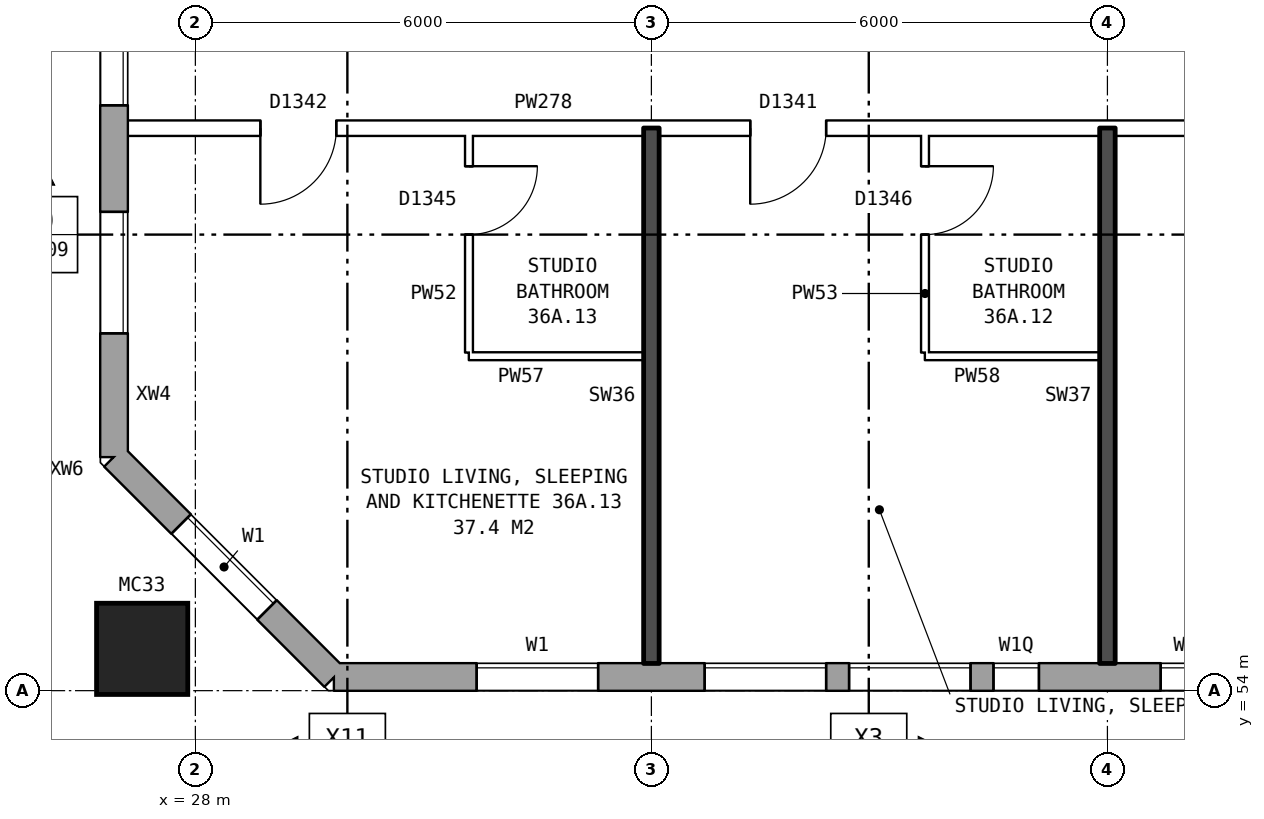
"""IFC4 building model, lengths in metres.
Left out: names, types, materials, properties, quantities, classifications, styles, units other than length and angle.
Written with IfcOpenShell. Run it as: python <this file> out.ifc"""

import sys

from ifc_helpers import new_model, si_unit, direction, frame, frame_2d, origin, origin_2d, place, context, subcontext, project, spatial, rectangle, hollow_rectangle, extrude, element, fill, save


model = new_model("IFC4")
c1 = context("Model", 3, precision=1e-05, world=origin(), true_north=direction((0.0, 1.0)))
c2 = subcontext(c1, "Body", "Model", "MODEL_VIEW")
j1 = project(units=[si_unit("LENGTHUNIT", "METRE"), si_unit("PLANEANGLEUNIT", "RADIAN")], contexts=[c1])
p1 = place(None, origin())
s1 = spatial("IfcSite", under=j1, at=p1, CompositionType="ELEMENT")
p2 = place(p1, origin())
s2 = spatial("IfcBuilding", under=s1, at=p2, CompositionType="ELEMENT")
p3 = place(p2, frame((0.0, 0.0, 129.9)))
s3 = spatial("IfcBuildingStorey", under=s2, at=p3, CompositionType="ELEMENT", Elevation=129.9)
p4 = place(p3, frame((27.3, 54.55, 0.0), z_axis=(0.0, 0.0, 1.0), x_axis=(1.0, 0.0, 0.0)))
e1 = element("IfcColumn", 1, at=p4, inside=s3, PredefinedType="COLUMN", context=c2, shape_type="SweptSolid", body=[
    extrude(hollow_rectangle(XDim=1.2, YDim=1.2, WallThickness=0.065, at=origin_2d()), origin(), (0.0, 0.0, 1.0), 3.1),
])
p5 = place(p3, frame((26.93, 57.075, 0.0), z_axis=(0.0, 0.0, 1.0), x_axis=(0.707106781187, -0.707106781187, 0.0)))
e2 = element("IfcWall", 2, at=p5, inside=s3, PredefinedType="STANDARD", context=c2, shape_type="SweptSolid", body=[
    extrude(rectangle(XDim=4.094, YDim=0.36, at=frame_2d((2.047, 0.0))), origin(), (0.0, 0.0, 1.0), 2.85),
])
p6 = place(p5, frame((1.247, 0.0, 0.8)))
e3 = element("IfcOpeningElement", 3, at=p6, cuts=e2, PredefinedType="OPENING", context=c2, shape_type="SweptSolid", body=[
    extrude(rectangle(XDim=1.6, YDim=1.8, at=frame_2d((0.8, 0.9))), frame((0.0, 0.19, 0.0), z_axis=(0.0, -1.0, 0.0), x_axis=(1.0, 0.0, 0.0)), (0.0, 0.0, 1.0), 0.38),
])
p7 = place(p3, frame((29.825, 54.18, 0.0), z_axis=(0.0, 0.0, 1.0), x_axis=(1.0, 0.0, 0.0)))
e4 = element("IfcWall", 4, at=p7, inside=s3, PredefinedType="STANDARD", context=c2, shape_type="SweptSolid", body=[
    extrude(rectangle(XDim=43.101, YDim=0.36, at=frame_2d((21.55, 0.0))), origin(), (0.0, 0.0, 1.0), 2.85),
])
p8 = place(p7, frame((1.875, 0.0, 0.8)))
e5 = element("IfcOpeningElement", 5, at=p8, cuts=e4, PredefinedType="OPENING", context=c2, shape_type="SweptSolid", body=[
    extrude(rectangle(XDim=1.6, YDim=1.8, at=frame_2d((0.8, 0.9))), frame((0.0, 0.19, 0.0), z_axis=(0.0, -1.0, 0.0), x_axis=(1.0, 0.0, 0.0)), (0.0, 0.0, 1.0), 0.38),
])
p9 = place(p7, frame((4.875, 0.0, 0.8)))
e6 = element("IfcOpeningElement", 6, at=p9, cuts=e4, PredefinedType="OPENING", context=c2, shape_type="SweptSolid", body=[
    extrude(rectangle(XDim=1.6, YDim=1.8, at=frame_2d((0.8, 0.9))), frame((0.0, 0.19, 0.0), z_axis=(0.0, -1.0, 0.0), x_axis=(1.0, 0.0, 0.0)), (0.0, 0.0, 1.0), 0.38),
])
p10 = place(p7, frame((6.775, 0.0, 0.8)))
e7 = element("IfcOpeningElement", 7, at=p10, cuts=e4, PredefinedType="OPENING", context=c2, shape_type="SweptSolid", body=[
    extrude(rectangle(XDim=1.6, YDim=1.8, at=frame_2d((0.8, 0.9))), frame((0.0, 0.19, 0.0), z_axis=(0.0, -1.0, 0.0), x_axis=(1.0, 0.0, 0.0)), (0.0, 0.0, 1.0), 0.38),
])
p11 = place(p7, frame((10.875, 0.0, 0.8)))
e8 = element("IfcOpeningElement", 8, at=p11, cuts=e4, PredefinedType="OPENING", context=c2, shape_type="SweptSolid", body=[
    extrude(rectangle(XDim=0.8, YDim=0.9, at=frame_2d((0.4, 0.45))), frame((0.0, 0.19, 0.0), z_axis=(0.0, -1.0, 0.0), x_axis=(1.0, 0.0, 0.0)), (0.0, 0.0, 1.0), 0.38),
])
p12 = place(p7, frame((13.875, 0.0, 0.8)))
e9 = element("IfcOpeningElement", 9, at=p12, cuts=e4, PredefinedType="OPENING", context=c2, shape_type="SweptSolid", body=[
    extrude(rectangle(XDim=1.6, YDim=1.8, at=frame_2d((0.8, 0.9))), frame((0.0, 0.19, 0.0), z_axis=(0.0, -1.0, 0.0), x_axis=(1.0, 0.0, 0.0)), (0.0, 0.0, 1.0), 0.38),
])
p13 = place(p7, frame((16.875, 0.0, 0.8)))
e10 = element("IfcOpeningElement", 10, at=p13, cuts=e4, PredefinedType="OPENING", context=c2, shape_type="SweptSolid", body=[
    extrude(rectangle(XDim=1.6, YDim=1.8, at=frame_2d((0.8, 0.9))), frame((0.0, 0.19, 0.0), z_axis=(0.0, -1.0, 0.0), x_axis=(1.0, 0.0, 0.0)), (0.0, 0.0, 1.0), 0.38),
])
p14 = place(p7, frame((19.875, 0.0, 0.8)))
e11 = element("IfcOpeningElement", 11, at=p14, cuts=e4, PredefinedType="OPENING", context=c2, shape_type="SweptSolid", body=[
    extrude(rectangle(XDim=1.6, YDim=1.8, at=frame_2d((0.8, 0.9))), frame((0.0, 0.19, 0.0), z_axis=(0.0, -1.0, 0.0), x_axis=(1.0, 0.0, 0.0)), (0.0, 0.0, 1.0), 0.38),
])
p15 = place(p7, frame((22.875, 0.0, 0.8)))
e12 = element("IfcOpeningElement", 12, at=p15, cuts=e4, PredefinedType="OPENING", context=c2, shape_type="SweptSolid", body=[
    extrude(rectangle(XDim=1.6, YDim=1.8, at=frame_2d((0.8, 0.9))), frame((0.0, 0.19, 0.0), z_axis=(0.0, -1.0, 0.0), x_axis=(1.0, 0.0, 0.0)), (0.0, 0.0, 1.0), 0.38),
])
p16 = place(p7, frame((25.875, 0.0, 0.8)))
e13 = element("IfcOpeningElement", 13, at=p16, cuts=e4, PredefinedType="OPENING", context=c2, shape_type="SweptSolid", body=[
    extrude(rectangle(XDim=1.6, YDim=1.8, at=frame_2d((0.8, 0.9))), frame((0.0, 0.19, 0.0), z_axis=(0.0, -1.0, 0.0), x_axis=(1.0, 0.0, 0.0)), (0.0, 0.0, 1.0), 0.38),
])
p17 = place(p7, frame((28.875, 0.0, 0.8)))
e14 = element("IfcOpeningElement", 14, at=p17, cuts=e4, PredefinedType="OPENING", context=c2, shape_type="SweptSolid", body=[
    extrude(rectangle(XDim=1.6, YDim=1.8, at=frame_2d((0.8, 0.9))), frame((0.0, 0.19, 0.0), z_axis=(0.0, -1.0, 0.0), x_axis=(1.0, 0.0, 0.0)), (0.0, 0.0, 1.0), 0.38),
])
p18 = place(p7, frame((31.325, 0.0, 0.15)))
e15 = element("IfcOpeningElement", 15, at=p18, cuts=e4, PredefinedType="OPENING", context=c2, shape_type="SweptSolid", body=[
    extrude(rectangle(XDim=0.6, YDim=1.8, at=frame_2d((0.3, 0.9))), frame((0.0, 0.19, 0.0), z_axis=(0.0, -1.0, 0.0), x_axis=(1.0, 0.0, 0.0)), (0.0, 0.0, 1.0), 0.38),
])
p19 = place(p7, frame((34.875, 0.0, 0.8)))
e16 = element("IfcOpeningElement", 16, at=p19, cuts=e4, PredefinedType="OPENING", context=c2, shape_type="SweptSolid", body=[
    extrude(rectangle(XDim=1.6, YDim=1.8, at=frame_2d((0.8, 0.9))), frame((0.0, 0.19, 0.0), z_axis=(0.0, -1.0, 0.0), x_axis=(1.0, 0.0, 0.0)), (0.0, 0.0, 1.0), 0.38),
])
p20 = place(p7, frame((37.875, 0.0, 0.8)))
e17 = element("IfcOpeningElement", 17, at=p20, cuts=e4, PredefinedType="OPENING", context=c2, shape_type="SweptSolid", body=[
    extrude(rectangle(XDim=1.6, YDim=1.8, at=frame_2d((0.8, 0.9))), frame((0.0, 0.19, 0.0), z_axis=(0.0, -1.0, 0.0), x_axis=(1.0, 0.0, 0.0)), (0.0, 0.0, 1.0), 0.38),
])
p21 = place(p7, frame((40.875, 0.0, 0.8)))
e18 = element("IfcOpeningElement", 18, at=p21, cuts=e4, PredefinedType="OPENING", context=c2, shape_type="SweptSolid", body=[
    extrude(rectangle(XDim=1.6, YDim=1.8, at=frame_2d((0.8, 0.9))), frame((0.0, 0.19, 0.0), z_axis=(0.0, -1.0, 0.0), x_axis=(1.0, 0.0, 0.0)), (0.0, 0.0, 1.0), 0.38),
])
p22 = place(p7, frame((8.675, 0.0, 1.3)))
e19 = element("IfcOpeningElement", 19, at=p22, cuts=e4, PredefinedType="OPENING", context=c2, shape_type="SweptSolid", body=[
    extrude(rectangle(XDim=0.6, YDim=1.2, at=frame_2d((0.3, 0.6))), frame((0.0, 0.19, 0.0), z_axis=(0.0, -1.0, 0.0), x_axis=(1.0, 0.0, 0.0)), (0.0, 0.0, 1.0), 0.38),
])
p23 = place(p7, frame((11.975, 0.0, 0.8)))
e20 = element("IfcOpeningElement", 20, at=p23, cuts=e4, PredefinedType="OPENING", context=c2, shape_type="SweptSolid", body=[
    extrude(rectangle(XDim=1.6, YDim=1.8, at=frame_2d((0.8, 0.9))), frame((0.0, 0.19, 0.0), z_axis=(0.0, -1.0, 0.0), x_axis=(1.0, 0.0, 0.0)), (0.0, 0.0, 1.0), 0.38),
])
p24 = place(p7, frame((32.225, 0.0, 0.25)))
e21 = element("IfcOpeningElement", 21, at=p24, cuts=e4, PredefinedType="OPENING", context=c2, shape_type="SweptSolid", body=[
    extrude(rectangle(XDim=0.6, YDim=0.9, at=frame_2d((0.3, 0.45))), frame((0.0, 0.19, 0.0), z_axis=(0.0, -1.0, 0.0), x_axis=(1.0, 0.0, 0.0)), (0.0, 0.0, 1.0), 0.38),
])
p25 = place(p3, frame((26.93, 82.925, 0.0), z_axis=(0.0, 0.0, 1.0), x_axis=(0.0, -1.0, 0.0)))
e22 = element("IfcWall", 22, at=p25, inside=s3, PredefinedType="STANDARD", context=c2, shape_type="SweptSolid", body=[
    extrude(rectangle(XDim=25.851, YDim=0.36, at=frame_2d((12.925, 0.0))), origin(), (0.0, 0.0, 1.0), 2.85),
])
p26 = place(p25, frame((1.625, 0.0, 0.8)))
e23 = element("IfcOpeningElement", 23, at=p26, cuts=e22, PredefinedType="OPENING", context=c2, shape_type="SweptSolid", body=[
    extrude(rectangle(XDim=1.6, YDim=1.8, at=frame_2d((0.8, 0.9))), frame((0.0, 0.19, 0.0), z_axis=(0.0, -1.0, 0.0), x_axis=(1.0, 0.0, 0.0)), (0.0, 0.0, 1.0), 0.38),
])
p27 = place(p25, frame((4.625, 0.0, 0.8)))
e24 = element("IfcOpeningElement", 24, at=p27, cuts=e22, PredefinedType="OPENING", context=c2, shape_type="SweptSolid", body=[
    extrude(rectangle(XDim=1.6, YDim=1.8, at=frame_2d((0.8, 0.9))), frame((0.0, 0.19, 0.0), z_axis=(0.0, -1.0, 0.0), x_axis=(1.0, 0.0, 0.0)), (0.0, 0.0, 1.0), 0.38),
])
p28 = place(p25, frame((7.625, 0.0, 0.8)))
e25 = element("IfcOpeningElement", 25, at=p28, cuts=e22, PredefinedType="OPENING", context=c2, shape_type="SweptSolid", body=[
    extrude(rectangle(XDim=1.6, YDim=1.8, at=frame_2d((0.8, 0.9))), frame((0.0, 0.19, 0.0), z_axis=(0.0, -1.0, 0.0), x_axis=(1.0, 0.0, 0.0)), (0.0, 0.0, 1.0), 0.38),
])
p29 = place(p25, frame((6.525, 0.0, 0.8)))
e26 = element("IfcOpeningElement", 26, at=p29, cuts=e22, PredefinedType="OPENING", context=c2, shape_type="SweptSolid", body=[
    extrude(rectangle(XDim=0.8, YDim=1.8, at=frame_2d((0.4, 0.9))), frame((0.0, 0.19, 0.0), z_axis=(0.0, -1.0, 0.0), x_axis=(1.0, 0.0, 0.0)), (0.0, 0.0, 1.0), 0.38),
])
p30 = place(p25, frame((9.525, 0.0, 0.8)))
e27 = element("IfcOpeningElement", 27, at=p30, cuts=e22, PredefinedType="OPENING", context=c2, shape_type="SweptSolid", body=[
    extrude(rectangle(XDim=1.4, YDim=1.2, at=frame_2d((0.7, 0.6))), frame((0.0, 0.19, 0.0), z_axis=(0.0, -1.0, 0.0), x_axis=(1.0, 0.0, 0.0)), (0.0, 0.0, 1.0), 0.38),
])
p31 = place(p25, frame((16.625, 0.0, 0.8)))
e28 = element("IfcOpeningElement", 28, at=p31, cuts=e22, PredefinedType="OPENING", context=c2, shape_type="SweptSolid", body=[
    extrude(rectangle(XDim=1.6, YDim=1.8, at=frame_2d((0.8, 0.9))), frame((0.0, 0.19, 0.0), z_axis=(0.0, -1.0, 0.0), x_axis=(1.0, 0.0, 0.0)), (0.0, 0.0, 1.0), 0.38),
])
p32 = place(p25, frame((19.625, 0.0, 0.8)))
e29 = element("IfcOpeningElement", 29, at=p32, cuts=e22, PredefinedType="OPENING", context=c2, shape_type="SweptSolid", body=[
    extrude(rectangle(XDim=1.6, YDim=1.8, at=frame_2d((0.8, 0.9))), frame((0.0, 0.19, 0.0), z_axis=(0.0, -1.0, 0.0), x_axis=(1.0, 0.0, 0.0)), (0.0, 0.0, 1.0), 0.38),
])
p33 = place(p25, frame((22.625, 0.0, 0.8)))
e30 = element("IfcOpeningElement", 30, at=p33, cuts=e22, PredefinedType="OPENING", context=c2, shape_type="SweptSolid", body=[
    extrude(rectangle(XDim=1.6, YDim=1.8, at=frame_2d((0.8, 0.9))), frame((0.0, 0.19, 0.0), z_axis=(0.0, -1.0, 0.0), x_axis=(1.0, 0.0, 0.0)), (0.0, 0.0, 1.0), 0.38),
])
p34 = place(p25, frame((12.275, 0.0, 0.8)))
e31 = element("IfcOpeningElement", 31, at=p34, cuts=e22, PredefinedType="OPENING", context=c2, shape_type="SweptSolid", body=[
    extrude(rectangle(XDim=1.2, YDim=1.8, at=frame_2d((0.6, 0.9))), frame((0.0, 0.19, 0.0), z_axis=(0.0, -1.0, 0.0), x_axis=(1.0, 0.0, 0.0)), (0.0, 0.0, 1.0), 0.38),
])
p35 = place(p25, frame((14.425, 0.0, 0.8)))
e32 = element("IfcOpeningElement", 32, at=p35, cuts=e22, PredefinedType="OPENING", context=c2, shape_type="SweptSolid", body=[
    extrude(rectangle(XDim=1.2, YDim=0.9, at=frame_2d((0.6, 0.45))), frame((0.0, 0.19, 0.0), z_axis=(0.0, -1.0, 0.0), x_axis=(1.0, 0.0, 0.0)), (0.0, 0.0, 1.0), 0.38),
])
p36 = place(p25, frame((18.525, 0.0, 0.8)))
e33 = element("IfcOpeningElement", 33, at=p36, cuts=e22, PredefinedType="OPENING", context=c2, shape_type="SweptSolid", body=[
    extrude(rectangle(XDim=0.6, YDim=1.8, at=frame_2d((0.3, 0.9))), frame((0.0, 0.19, 0.0), z_axis=(0.0, -1.0, 0.0), x_axis=(1.0, 0.0, 0.0)), (0.0, 0.0, 1.0), 0.38),
])
for number, where, z_axis, x_axis in (
    (34, (31.6, 58.4, 0.0), (0.0, 0.0, 1.0), (1.0, 0.0, 0.0)),
    (35, (37.6, 58.4, 0.0), (0.0, 0.0, 1.0), (1.0, 0.0, 0.0)),
):
    element("IfcWall", number, at=place(p3, frame(where, z_axis=z_axis, x_axis=x_axis)), inside=s3, PredefinedType="PARTITIONING", context=c2, shape_type="SweptSolid", body=[
        extrude(rectangle(XDim=2.3, YDim=0.1, at=frame_2d((1.15, 0.0))), origin(), (0.0, 0.0, 1.0), 2.85),
    ])
p37 = place(p3, frame((27.11, 61.4, 0.0), z_axis=(0.0, 0.0, 1.0), x_axis=(1.0, 0.0, 0.0)))
e36 = element("IfcWall", 36, at=p37, inside=s3, PredefinedType="PARTITIONING", context=c2, shape_type="SweptSolid", body=[
    extrude(rectangle(XDim=18.79, YDim=0.2, at=frame_2d((9.395, 0.0))), origin(), (0.0, 0.0, 1.0), 2.85),
])
p38 = place(p37, frame((14.19, 0.0, 0.0)))
e37 = element("IfcOpeningElement", 37, at=p38, cuts=e36, PredefinedType="OPENING", context=c2, shape_type="SweptSolid", body=[
    extrude(rectangle(XDim=1.0, YDim=2.1, at=frame_2d((0.5, 1.05))), frame((0.0, 0.11, 0.0), z_axis=(0.0, -1.0, 0.0), x_axis=(1.0, 0.0, 0.0)), (0.0, 0.0, 1.0), 0.22),
])
p39 = place(p37, frame((8.19, 0.0, 0.0)))
e38 = element("IfcOpeningElement", 38, at=p39, cuts=e36, PredefinedType="OPENING", context=c2, shape_type="SweptSolid", body=[
    extrude(rectangle(XDim=1.0, YDim=2.1, at=frame_2d((0.5, 1.05))), frame((0.0, 0.11, 0.0), z_axis=(0.0, -1.0, 0.0), x_axis=(1.0, 0.0, 0.0)), (0.0, 0.0, 1.0), 0.22),
])
p40 = place(p37, frame((1.745, 0.0, 0.0)))
e39 = element("IfcOpeningElement", 39, at=p40, cuts=e36, PredefinedType="OPENING", context=c2, shape_type="SweptSolid", body=[
    extrude(rectangle(XDim=1.0, YDim=2.1, at=frame_2d((0.5, 1.05))), frame((0.0, 0.11, 0.0), z_axis=(0.0, -1.0, 0.0), x_axis=(1.0, 0.0, 0.0)), (0.0, 0.0, 1.0), 0.22),
])
p41 = place(p3, frame((31.6, 58.45, 0.0), z_axis=(0.0, 0.0, 1.0), x_axis=(0.0, 1.0, 0.0)))
e40 = element("IfcWall", 40, at=p41, inside=s3, PredefinedType="PARTITIONING", context=c2, shape_type="SweptSolid", body=[
    extrude(rectangle(XDim=2.85, YDim=0.1, at=frame_2d((1.425, 0.0))), origin(), (0.0, 0.0, 1.0), 2.85),
])
p42 = place(p41, frame((1.55, 0.0, 0.0)))
e41 = element("IfcOpeningElement", 41, at=p42, cuts=e40, PredefinedType="OPENING", context=c2, shape_type="SweptSolid", body=[
    extrude(rectangle(XDim=0.9, YDim=2.1, at=frame_2d((0.45, 1.05))), frame((0.0, 0.06, 0.0), z_axis=(0.0, -1.0, 0.0), x_axis=(1.0, 0.0, 0.0)), (0.0, 0.0, 1.0), 0.12),
])
p43 = place(p3, frame((34.0, 54.36, 0.0), z_axis=(0.0, 0.0, 1.0), x_axis=(0.0, 1.0, 0.0)))
e42 = element("IfcWall", 42, at=p43, inside=s3, PredefinedType="SOLIDWALL", context=c2, shape_type="SweptSolid", body=[
    extrude(rectangle(XDim=7.04, YDim=0.2, at=frame_2d((3.52, 0.0))), origin(), (0.0, 0.0, 1.0), 2.85),
])
p44 = place(p3, frame((37.6, 58.45, 0.0), z_axis=(0.0, 0.0, 1.0), x_axis=(0.0, 1.0, 0.0)))
e43 = element("IfcWall", 43, at=p44, inside=s3, PredefinedType="PARTITIONING", context=c2, shape_type="SweptSolid", body=[
    extrude(rectangle(XDim=2.85, YDim=0.1, at=frame_2d((1.425, 0.0))), origin(), (0.0, 0.0, 1.0), 2.85),
])
p45 = place(p44, frame((1.55, 0.0, 0.0)))
e44 = element("IfcOpeningElement", 44, at=p45, cuts=e43, PredefinedType="OPENING", context=c2, shape_type="SweptSolid", body=[
    extrude(rectangle(XDim=0.9, YDim=2.1, at=frame_2d((0.45, 1.05))), frame((0.0, 0.06, 0.0), z_axis=(0.0, -1.0, 0.0), x_axis=(1.0, 0.0, 0.0)), (0.0, 0.0, 1.0), 0.12),
])
p46 = place(p3, frame((40.0, 54.36, 0.0), z_axis=(0.0, 0.0, 1.0), x_axis=(0.0, 1.0, 0.0)))
e45 = element("IfcWall", 45, at=p46, inside=s3, PredefinedType="SOLIDWALL", context=c2, shape_type="SweptSolid", body=[
    extrude(rectangle(XDim=7.04, YDim=0.2, at=frame_2d((3.52, 0.0))), origin(), (0.0, 0.0, 1.0), 2.85),
])
p47 = place(p6, origin())
e46 = element("IfcWindow", 46, at=p47, inside=s3, PartitioningType="SINGLE_PANEL", PredefinedType="WINDOW", context=c2, shape_type="SweptSolid", body=[
    extrude(rectangle(XDim=1.6, YDim=1.8, at=frame_2d((0.8, 0.9))), frame((0.0, 0.15, 0.0), z_axis=(0.0, -1.0, 0.0), x_axis=(1.0, 0.0, 0.0)), (0.0, 0.0, 1.0), 0.06),
])
fill(e3, e46)
p48 = place(p8, origin())
e47 = element("IfcWindow", 47, at=p48, inside=s3, PartitioningType="SINGLE_PANEL", PredefinedType="WINDOW", context=c2, shape_type="SweptSolid", body=[
    extrude(rectangle(XDim=1.6, YDim=1.8, at=frame_2d((0.8, 0.9))), frame((0.0, 0.15, 0.0), z_axis=(0.0, -1.0, 0.0), x_axis=(1.0, 0.0, 0.0)), (0.0, 0.0, 1.0), 0.06),
])
fill(e5, e47)
p49 = place(p9, origin())
e48 = element("IfcWindow", 48, at=p49, inside=s3, PartitioningType="SINGLE_PANEL", PredefinedType="WINDOW", context=c2, shape_type="SweptSolid", body=[
    extrude(rectangle(XDim=1.6, YDim=1.8, at=frame_2d((0.8, 0.9))), frame((0.0, 0.15, 0.0), z_axis=(0.0, -1.0, 0.0), x_axis=(1.0, 0.0, 0.0)), (0.0, 0.0, 1.0), 0.06),
])
fill(e6, e48)
p50 = place(p10, origin())
e49 = element("IfcWindow", 49, at=p50, inside=s3, PartitioningType="SINGLE_PANEL", PredefinedType="WINDOW", context=c2, shape_type="SweptSolid", body=[
    extrude(rectangle(XDim=1.6, YDim=1.8, at=frame_2d((0.8, 0.9))), frame((0.0, 0.15, 0.0), z_axis=(0.0, -1.0, 0.0), x_axis=(1.0, 0.0, 0.0)), (0.0, 0.0, 1.0), 0.06),
])
fill(e7, e49)
p51 = place(p11, origin())
e50 = element("IfcWindow", 50, at=p51, inside=s3, PartitioningType="SINGLE_PANEL", PredefinedType="WINDOW", context=c2, shape_type="SweptSolid", body=[
    extrude(rectangle(XDim=0.8, YDim=0.9, at=frame_2d((0.4, 0.45))), frame((0.0, 0.15, 0.0), z_axis=(0.0, -1.0, 0.0), x_axis=(1.0, 0.0, 0.0)), (0.0, 0.0, 1.0), 0.06),
])
fill(e8, e50)
p52 = place(p32, origin())
e51 = element("IfcWindow", 51, at=p52, inside=s3, PartitioningType="SINGLE_PANEL", PredefinedType="WINDOW", context=c2, shape_type="SweptSolid", body=[
    extrude(rectangle(XDim=1.6, YDim=1.8, at=frame_2d((0.8, 0.9))), frame((0.0, 0.15, 0.0), z_axis=(0.0, -1.0, 0.0), x_axis=(1.0, 0.0, 0.0)), (0.0, 0.0, 1.0), 0.06),
])
fill(e29, e51)
p53 = place(p33, origin())
e52 = element("IfcWindow", 52, at=p53, inside=s3, PartitioningType="SINGLE_PANEL", PredefinedType="WINDOW", context=c2, shape_type="SweptSolid", body=[
    extrude(rectangle(XDim=1.6, YDim=1.8, at=frame_2d((0.8, 0.9))), frame((0.0, 0.15, 0.0), z_axis=(0.0, -1.0, 0.0), x_axis=(1.0, 0.0, 0.0)), (0.0, 0.0, 1.0), 0.06),
])
fill(e30, e52)
p54 = place(p39, frame((1.0, 0.0, 0.0), z_axis=(0.0, 0.0, 1.0), x_axis=(-1.0, 0.0, 0.0)))
e53 = element("IfcDoor", 53, at=p54, inside=s3, OperationType="SINGLE_SWING_RIGHT", PredefinedType="DOOR", context=c2, shape_type="SweptSolid", body=[
    extrude(rectangle(XDim=1.0, YDim=2.1, at=frame_2d((0.5, 1.05))), frame((0.0, 0.025, 0.0), z_axis=(0.0, -1.0, 0.0), x_axis=(1.0, 0.0, 0.0)), (0.0, 0.0, 1.0), 0.05),
])
fill(e38, e53)
p55 = place(p45, frame((0.9, 0.0, 0.0), z_axis=(0.0, 0.0, 1.0), x_axis=(-1.0, 0.0, 0.0)))
e54 = element("IfcDoor", 54, at=p55, inside=s3, OperationType="SINGLE_SWING_LEFT", PredefinedType="DOOR", context=c2, shape_type="SweptSolid", body=[
    extrude(rectangle(XDim=0.9, YDim=2.1, at=frame_2d((0.45, 1.05))), frame((0.0, 0.025, 0.0), z_axis=(0.0, -1.0, 0.0), x_axis=(1.0, 0.0, 0.0)), (0.0, 0.0, 1.0), 0.05),
])
fill(e44, e54)
p56 = place(p40, frame((1.0, 0.0, 0.0), z_axis=(0.0, 0.0, 1.0), x_axis=(-1.0, 0.0, 0.0)))
e55 = element("IfcDoor", 55, at=p56, inside=s3, OperationType="SINGLE_SWING_RIGHT", PredefinedType="DOOR", context=c2, shape_type="SweptSolid", body=[
    extrude(rectangle(XDim=1.0, YDim=2.1, at=frame_2d((0.5, 1.05))), frame((0.0, 0.025, 0.0), z_axis=(0.0, -1.0, 0.0), x_axis=(1.0, 0.0, 0.0)), (0.0, 0.0, 1.0), 0.05),
])
fill(e39, e55)
p57 = place(p42, frame((0.9, 0.0, 0.0), z_axis=(0.0, 0.0, 1.0), x_axis=(-1.0, 0.0, 0.0)))
e56 = element("IfcDoor", 56, at=p57, inside=s3, OperationType="SINGLE_SWING_LEFT", PredefinedType="DOOR", context=c2, shape_type="SweptSolid", body=[
    extrude(rectangle(XDim=0.9, YDim=2.1, at=frame_2d((0.45, 1.05))), frame((0.0, 0.025, 0.0), z_axis=(0.0, -1.0, 0.0), x_axis=(1.0, 0.0, 0.0)), (0.0, 0.0, 1.0), 0.05),
])
fill(e41, e56)
p58 = place(p22, origin())
e57 = element("IfcWindow", 57, at=p58, inside=s3, PartitioningType="SINGLE_PANEL", PredefinedType="WINDOW", context=c2, shape_type="SweptSolid", body=[
    extrude(rectangle(XDim=0.6, YDim=1.2, at=frame_2d((0.3, 0.6))), frame((0.0, 0.15, 0.0), z_axis=(0.0, -1.0, 0.0), x_axis=(1.0, 0.0, 0.0)), (0.0, 0.0, 1.0), 0.06),
])
fill(e19, e57)
save(model, sys.argv[1])
